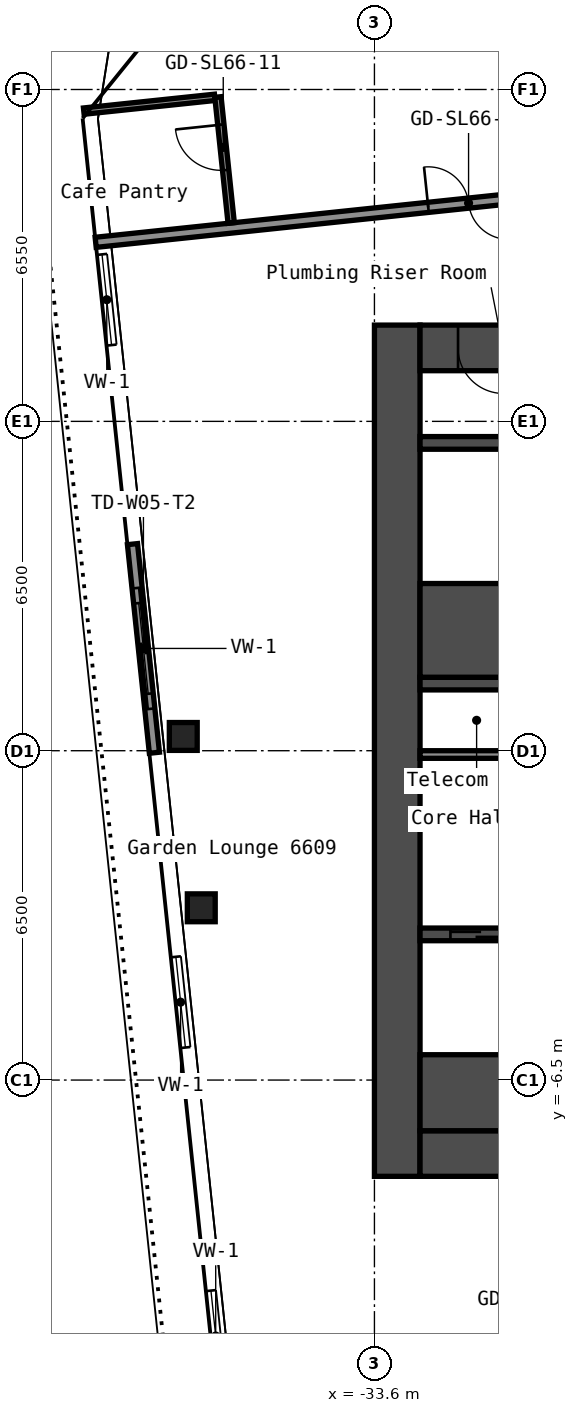
"""IFC4 building model, lengths in metres.
Left out: names, types, materials, properties, quantities, classifications, styles, units other than length and angle.
Written with IfcOpenShell. Run it as: python <this file> out.ifc"""

import sys

from ifc_helpers import new_model, si_unit, direction, frame, frame_2d, origin, origin_2d, place, context, subcontext, project, spatial, rectangle, hollow_rectangle, extrude, element, fill, save


model = new_model("IFC4")
c1 = context("Model", 3, precision=1e-05, world=origin(), true_north=direction((0.0, 1.0)))
c2 = subcontext(c1, "Body", "Model", "MODEL_VIEW")
j1 = project(units=[si_unit("LENGTHUNIT", "METRE"), si_unit("PLANEANGLEUNIT", "RADIAN")], contexts=[c1])
p1 = place(None, origin())
s1 = spatial("IfcSite", under=j1, at=p1, CompositionType="ELEMENT")
p2 = place(p1, origin())
s2 = spatial("IfcBuilding", under=s1, at=p2, CompositionType="ELEMENT")
p3 = place(p2, frame((0.0, 0.0, 232.6)))
s3 = spatial("IfcBuildingStorey", under=s2, at=p3, CompositionType="ELEMENT", Elevation=232.6)
for number, where, z_axis, x_axis in (
    (1, (-37.017, -3.1, 0.0), (0.0, 0.0, 1.0), (1.0, 0.0, 0.0)),
    (2, (-37.373, 0.281, 0.0), (0.0, 0.0, 1.0), (1.0, 0.0, 0.0)),
):
    element("IfcColumn", number, at=place(p3, frame(where, z_axis=z_axis, x_axis=x_axis)), inside=s3, PredefinedType="COLUMN", context=c2, shape_type="SweptSolid", body=[
        extrude(hollow_rectangle(XDim=0.55, YDim=0.55, WallThickness=0.022, InnerFilletRadius=0.033, OuterFilletRadius=0.055, at=origin_2d()), origin(), (0.0, 0.0, 1.0), 5.95),
    ])
p4 = place(p3, frame((-33.15, -8.4, 0.0), z_axis=(0.0, 0.0, 1.0), x_axis=(0.0, 1.0, 0.0)))
e3 = element("IfcWall", 3, at=p4, inside=s3, PredefinedType="SHEAR", context=c2, shape_type="SweptSolid", body=[
    extrude(rectangle(XDim=16.8, YDim=0.9, at=frame_2d((8.4, 0.0))), origin(), (0.0, 0.0, 1.0), 5.95),
])
p5 = place(p3, frame((-32.7, 7.95, 0.0), z_axis=(0.0, 0.0, 1.0), x_axis=(1.0, 0.0, 0.0)))
e4 = element("IfcWall", 4, at=p5, inside=s3, PredefinedType="SHEAR", context=c2, shape_type="SweptSolid", body=[
    extrude(rectangle(XDim=15.0, YDim=0.9, at=frame_2d((7.5, 0.0))), origin(), (0.0, 0.0, 1.0), 5.95),
])
p6 = place(p5, frame((3.4, 0.0, 0.0)))
e5 = element("IfcOpeningElement", 5, at=p6, cuts=e4, PredefinedType="OPENING", context=c2, shape_type="SweptSolid", body=[
    extrude(rectangle(XDim=1.2, YDim=2.1, at=frame_2d((0.6, 1.05))), frame((0.0, 0.46, 0.0), z_axis=(0.0, -1.0, 0.0), x_axis=(1.0, 0.0, 0.0)), (0.0, 0.0, 1.0), 0.92),
])
p7 = place(p5, frame((0.75, 0.0, 0.0)))
e6 = element("IfcOpeningElement", 6, at=p7, cuts=e4, PredefinedType="OPENING", context=c2, shape_type="SweptSolid", body=[
    extrude(rectangle(XDim=0.9, YDim=2.1, at=frame_2d((0.45, 1.05))), frame((0.0, 0.46, 0.0), z_axis=(0.0, -1.0, 0.0), x_axis=(1.0, 0.0, 0.0)), (0.0, 0.0, 1.0), 0.92),
])
p8 = place(p3, frame((-32.7, -7.95, 0.0), z_axis=(0.0, 0.0, 1.0), x_axis=(1.0, 0.0, 0.0)))
e7 = element("IfcWall", 7, at=p8, inside=s3, PredefinedType="SHEAR", context=c2, shape_type="SweptSolid", body=[
    extrude(rectangle(XDim=15.0, YDim=0.9, at=frame_2d((7.5, 0.0))), origin(), (0.0, 0.0, 1.0), 5.95),
])
p9 = place(p8, frame((11.45, 0.0, 0.0)))
e8 = element("IfcOpeningElement", 8, at=p9, cuts=e7, PredefinedType="OPENING", context=c2, shape_type="SweptSolid", body=[
    extrude(rectangle(XDim=1.0, YDim=2.1, at=frame_2d((0.5, 1.05))), frame((0.0, 0.46, 0.0), z_axis=(0.0, -1.0, 0.0), x_axis=(1.0, 0.0, 0.0)), (0.0, 0.0, 1.0), 0.92),
])
p10 = place(p3, frame((-32.7, 1.325, 0.0), z_axis=(0.0, 0.0, 1.0), x_axis=(1.0, 0.0, 0.0)))
e9 = element("IfcWall", 9, at=p10, inside=s3, PredefinedType="SHEAR", context=c2, shape_type="SweptSolid", body=[
    extrude(rectangle(XDim=5.05, YDim=0.25, at=frame_2d((2.525, 0.0))), origin(), (0.0, 0.0, 1.0), 5.95),
])
p11 = place(p10, frame((3.3, 0.0, 0.0)))
e10 = element("IfcOpeningElement", 10, at=p11, cuts=e9, PredefinedType="OPENING", context=c2, shape_type="SweptSolid", body=[
    extrude(rectangle(XDim=1.2, YDim=2.1, at=frame_2d((0.6, 1.05))), frame((0.0, 0.135, 0.0), z_axis=(0.0, -1.0, 0.0), x_axis=(1.0, 0.0, 0.0)), (0.0, 0.0, 1.0), 0.27),
])
p12 = place(p3, frame((-32.7, 2.375, 0.0), z_axis=(0.0, 0.0, 1.0), x_axis=(1.0, 0.0, 0.0)))
e11 = element("IfcWall", 11, at=p12, inside=s3, PredefinedType="SHEAR", context=c2, shape_type="SweptSolid", body=[
    extrude(rectangle(XDim=2.4, YDim=1.85, at=frame_2d((1.2, 0.0))), origin(), (0.0, 0.0, 1.0), 5.95),
])
p13 = place(p3, frame((-32.7, 6.075, 0.0), z_axis=(0.0, 0.0, 1.0), x_axis=(1.0, 0.0, 0.0)))
e12 = element("IfcWall", 12, at=p13, inside=s3, PredefinedType="SHEAR", context=c2, shape_type="SweptSolid", body=[
    extrude(rectangle(XDim=2.4, YDim=0.25, at=frame_2d((1.2, 0.0))), origin(), (0.0, 0.0, 1.0), 5.95),
])
p14 = place(p3, frame((-32.7, -3.625, 0.0), z_axis=(0.0, 0.0, 1.0), x_axis=(1.0, 0.0, 0.0)))
e13 = element("IfcWall", 13, at=p14, inside=s3, PredefinedType="SHEAR", context=c2, shape_type="SweptSolid", body=[
    extrude(rectangle(XDim=4.55, YDim=0.25, at=frame_2d((2.275, 0.0))), origin(), (0.0, 0.0, 1.0), 5.95),
])
p15 = place(p14, frame((2.85, 0.0, 0.0)))
e14 = element("IfcOpeningElement", 14, at=p15, cuts=e13, PredefinedType="OPENING", context=c2, shape_type="SweptSolid", body=[
    extrude(rectangle(XDim=1.1, YDim=2.1, at=frame_2d((0.55, 1.05))), frame((0.0, 0.135, 0.0), z_axis=(0.0, -1.0, 0.0), x_axis=(1.0, 0.0, 0.0)), (0.0, 0.0, 1.0), 0.27),
])
p16 = place(p14, frame((0.6, 0.0, 0.0)))
e15 = element("IfcOpeningElement", 15, at=p16, cuts=e13, PredefinedType="OPENING", context=c2, shape_type="SweptSolid", body=[
    extrude(rectangle(XDim=1.1, YDim=2.1, at=frame_2d((0.55, 1.05))), frame((0.0, 0.135, 0.0), z_axis=(0.0, -1.0, 0.0), x_axis=(1.0, 0.0, 0.0)), (0.0, 0.0, 1.0), 0.27),
])
p17 = place(p3, frame((-32.7, -6.75, 0.0), z_axis=(0.0, 0.0, 1.0), x_axis=(1.0, 0.0, 0.0)))
e16 = element("IfcWall", 16, at=p17, inside=s3, PredefinedType="SHEAR", context=c2, shape_type="SweptSolid", body=[
    extrude(rectangle(XDim=4.55, YDim=1.5, at=frame_2d((2.275, 0.0))), origin(), (0.0, 0.0, 1.0), 5.95),
])
p18 = place(p3, frame((-32.7, -0.075, 0.0), z_axis=(0.0, 0.0, 1.0), x_axis=(1.0, 0.0, 0.0)))
e17 = element("IfcWall", 17, at=p18, inside=s3, PredefinedType="PARTITIONING", context=c2, shape_type="SweptSolid", body=[
    extrude(rectangle(XDim=3.0, YDim=0.15, at=frame_2d((1.5, 0.0))), origin(), (0.0, 0.0, 1.0), 5.95),
])
p19 = place(p3, frame((-36.712, -12.705, 0.0), z_axis=(0.0, 0.0, 1.0), x_axis=(0.994522460242, 0.104523088709, 0.0)))
e18 = element("IfcWall", 18, at=p19, inside=s3, PredefinedType="PARTITIONING", context=c2, shape_type="SweptSolid", body=[
    extrude(rectangle(XDim=21.3, YDim=0.2, at=frame_2d((10.65, 0.0))), origin(), (0.0, 0.0, 1.0), 5.95),
])
p20 = place(p19, frame((1.59, 0.0, 0.0)))
e19 = element("IfcOpeningElement", 19, at=p20, cuts=e18, PredefinedType="OPENING", context=c2, shape_type="SweptSolid", body=[
    extrude(rectangle(XDim=0.9, YDim=2.1, at=frame_2d((0.45, 1.05))), frame((0.0, 0.11, 0.0), z_axis=(0.0, -1.0, 0.0), x_axis=(1.0, 0.0, 0.0)), (0.0, 0.0, 1.0), 0.22),
])
p21 = place(p19, frame((5.875, 0.0, 0.0)))
e20 = element("IfcOpeningElement", 20, at=p21, cuts=e18, PredefinedType="OPENING", context=c2, shape_type="SweptSolid", body=[
    extrude(rectangle(XDim=0.9, YDim=2.1, at=frame_2d((0.45, 1.05))), frame((0.0, 0.11, 0.0), z_axis=(0.0, -1.0, 0.0), x_axis=(1.0, 0.0, 0.0)), (0.0, 0.0, 1.0), 0.22),
])
p22 = place(p19, frame((10.435, 0.0, 0.0)))
e21 = element("IfcOpeningElement", 21, at=p22, cuts=e18, PredefinedType="OPENING", context=c2, shape_type="SweptSolid", body=[
    extrude(rectangle(XDim=0.9, YDim=2.1, at=frame_2d((0.45, 1.05))), frame((0.0, 0.11, 0.0), z_axis=(0.0, -1.0, 0.0), x_axis=(1.0, 0.0, 0.0)), (0.0, 0.0, 1.0), 0.22),
])
p23 = place(p19, frame((14.3, 0.0, 0.0)))
e22 = element("IfcOpeningElement", 22, at=p23, cuts=e18, PredefinedType="OPENING", context=c2, shape_type="SweptSolid", body=[
    extrude(rectangle(XDim=0.9, YDim=2.1, at=frame_2d((0.45, 1.05))), frame((0.0, 0.11, 0.0), z_axis=(0.0, -1.0, 0.0), x_axis=(1.0, 0.0, 0.0)), (0.0, 0.0, 1.0), 0.22),
])
p24 = place(p19, frame((18.5, 0.0, 0.0)))
e23 = element("IfcOpeningElement", 23, at=p24, cuts=e18, PredefinedType="OPENING", context=c2, shape_type="SweptSolid", body=[
    extrude(rectangle(XDim=0.9, YDim=2.1, at=frame_2d((0.45, 1.05))), frame((0.0, 0.11, 0.0), z_axis=(0.0, -1.0, 0.0), x_axis=(1.0, 0.0, 0.0)), (0.0, 0.0, 1.0), 0.22),
])
p25 = place(p3, frame((-39.102, 10.034, 0.0), z_axis=(0.0, 0.0, 1.0), x_axis=(0.994522585465, 0.104521897229, 0.0)))
e24 = element("IfcWall", 24, at=p25, inside=s3, PredefinedType="PARTITIONING", context=c2, shape_type="SweptSolid", body=[
    extrude(rectangle(XDim=21.3, YDim=0.2, at=frame_2d((10.65, 0.0))), origin(), (0.0, 0.0, 1.0), 5.95),
])
p26 = place(p25, frame((6.6, 0.0, 0.0)))
e25 = element("IfcOpeningElement", 25, at=p26, cuts=e24, PredefinedType="OPENING", context=c2, shape_type="SweptSolid", body=[
    extrude(rectangle(XDim=1.6, YDim=2.1, at=frame_2d((0.8, 1.05))), frame((0.0, 0.11, 0.0), z_axis=(0.0, -1.0, 0.0), x_axis=(1.0, 0.0, 0.0)), (0.0, 0.0, 1.0), 0.22),
])
p27 = place(p25, frame((15.14, 0.0, 0.0)))
e26 = element("IfcOpeningElement", 26, at=p27, cuts=e24, PredefinedType="OPENING", context=c2, shape_type="SweptSolid", body=[
    extrude(rectangle(XDim=0.9, YDim=2.1, at=frame_2d((0.45, 1.05))), frame((0.0, 0.11, 0.0), z_axis=(0.0, -1.0, 0.0), x_axis=(1.0, 0.0, 0.0)), (0.0, 0.0, 1.0), 0.22),
])
p28 = place(p25, frame((19.34, 0.0, 0.0)))
e27 = element("IfcOpeningElement", 27, at=p28, cuts=e24, PredefinedType="OPENING", context=c2, shape_type="SweptSolid", body=[
    extrude(rectangle(XDim=0.9, YDim=2.1, at=frame_2d((0.45, 1.05))), frame((0.0, 0.11, 0.0), z_axis=(0.0, -1.0, 0.0), x_axis=(1.0, 0.0, 0.0)), (0.0, 0.0, 1.0), 0.22),
])
p29 = place(p3, frame((-39.336, 12.624, 0.0), z_axis=(0.0, 0.0, 1.0), x_axis=(0.994523446942, 0.104513699976, 0.0)))
e28 = element("IfcWall", 28, at=p29, inside=s3, PredefinedType="PARTITIONING", context=c2, shape_type="SweptSolid", body=[
    extrude(rectangle(XDim=2.6, YDim=0.125, at=frame_2d((1.3, 0.0))), origin(), (0.0, 0.0, 1.0), 5.95),
])
p30 = place(p3, frame((-36.427, 10.416, 0.0), z_axis=(0.0, 0.0, 1.0), x_axis=(-0.104491611519, 0.994525767953, 0.0)))
e29 = element("IfcWall", 29, at=p30, inside=s3, PredefinedType="PARTITIONING", context=c2, shape_type="SweptSolid", body=[
    extrude(rectangle(XDim=2.5, YDim=0.125, at=frame_2d((1.25, 0.0))), origin(), (0.0, 0.0, 1.0), 5.95),
])
p31 = place(p30, frame((1.05, 0.0, 0.0)))
e30 = element("IfcOpeningElement", 30, at=p31, cuts=e29, PredefinedType="OPENING", context=c2, shape_type="SweptSolid", body=[
    extrude(rectangle(XDim=0.9, YDim=2.1, at=frame_2d((0.45, 1.05))), frame((0.0, 0.073, 0.0), z_axis=(0.0, -1.0, 0.0), x_axis=(1.0, 0.0, 0.0)), (0.0, 0.0, 1.0), 0.145),
])
p32 = place(p3, frame((-39.256, 12.461, 4.45), z_axis=(0.0, 0.0, 1.0), x_axis=(0.104506598742, -0.994524193179, 0.0)))
p33 = place(p32, frame((2.68, 0.0, 0.25)))
p34 = place(p33, origin())
e31 = element("IfcWindow", 31, at=p34, inside=s3, PartitioningType="SINGLE_PANEL", PredefinedType="WINDOW", context=c2, shape_type="SweptSolid", body=[
    extrude(rectangle(XDim=1.8, YDim=0.9, at=frame_2d((0.9, 0.45))), frame((0.0, 0.03, 0.0), z_axis=(0.0, -1.0, 0.0), x_axis=(1.0, 0.0, 0.0)), (0.0, 0.0, 1.0), 0.06),
])
p35 = place(p3, frame((-38.526, 5.509, 4.45), z_axis=(0.0, 0.0, 1.0), x_axis=(0.104543574031, -0.994520307047, 0.0)))
p36 = place(p35, frame((2.61, 0.0, 0.25)))
p37 = place(p36, origin())
e32 = element("IfcWindow", 32, at=p37, inside=s3, PartitioningType="SINGLE_PANEL", PredefinedType="WINDOW", context=c2, shape_type="SweptSolid", body=[
    extrude(rectangle(XDim=1.8, YDim=0.9, at=frame_2d((0.9, 0.45))), frame((0.0, 0.03, 0.0), z_axis=(0.0, -1.0, 0.0), x_axis=(1.0, 0.0, 0.0)), (0.0, 0.0, 1.0), 0.06),
])
p38 = place(p3, frame((-37.792, -1.472, 4.45), z_axis=(0.0, 0.0, 1.0), x_axis=(0.104512790532, -0.994523542514, 0.0)))
p39 = place(p38, frame((2.61, 0.0, 0.25)))
p40 = place(p39, origin())
e33 = element("IfcWindow", 33, at=p40, inside=s3, PartitioningType="SINGLE_PANEL", PredefinedType="WINDOW", context=c2, shape_type="SweptSolid", body=[
    extrude(rectangle(XDim=1.8, YDim=0.9, at=frame_2d((0.9, 0.45))), frame((0.0, 0.03, 0.0), z_axis=(0.0, -1.0, 0.0), x_axis=(1.0, 0.0, 0.0)), (0.0, 0.0, 1.0), 0.06),
])
p41 = place(p3, frame((-37.058, -8.453, 4.45), z_axis=(0.0, 0.0, 1.0), x_axis=(0.104541145751, -0.994520562304, 0.0)))
p42 = place(p41, frame((2.214, 0.0, 0.25)))
p43 = place(p42, origin())
e34 = element("IfcWindow", 34, at=p43, inside=s3, PartitioningType="SINGLE_PANEL", PredefinedType="WINDOW", context=c2, shape_type="SweptSolid", body=[
    extrude(rectangle(XDim=1.8, YDim=0.9, at=frame_2d((0.9, 0.45))), frame((0.0, 0.03, 0.0), z_axis=(0.0, -1.0, 0.0), x_axis=(1.0, 0.0, 0.0)), (0.0, 0.0, 1.0), 0.06),
])
p44 = place(p3, frame((-38.375, 4.077, 0.0), z_axis=(0.0, 0.0, 1.0), x_axis=(0.10450059231, -0.994524824329, 0.0)))
p45 = place(p44, frame((0.87, 0.0, 0.0)))
p46 = place(p45, frame((2.4, 0.0, 0.0), z_axis=(0.0, 0.0, 1.0), x_axis=(-1.0, 0.0, 0.0)))
e35 = element("IfcDoor", 35, at=p46, inside=s3, OperationType="SLIDING_TO_LEFT", PredefinedType="DOOR", context=c2, shape_type="SweptSolid", body=[
    extrude(rectangle(XDim=2.4, YDim=2.2, at=frame_2d((1.2, 1.1))), frame((0.0, 0.025, 0.0), z_axis=(0.0, -1.0, 0.0), x_axis=(1.0, 0.0, 0.0)), (0.0, 0.0, 1.0), 0.05),
])
p47 = place(p7, origin())
e36 = element("IfcDoor", 36, at=p47, inside=s3, OperationType="SINGLE_SWING_RIGHT", PredefinedType="DOOR", context=c2, shape_type="SweptSolid", body=[
    extrude(rectangle(XDim=0.9, YDim=2.1, at=frame_2d((0.45, 1.05))), frame((0.0, 0.025, 0.0), z_axis=(0.0, -1.0, 0.0), x_axis=(1.0, 0.0, 0.0)), (0.0, 0.0, 1.0), 0.05),
])
fill(e6, e36)
p48 = place(p16, origin())
e37 = element("IfcDoor", 37, at=p48, inside=s3, OperationType="DOUBLE_DOOR_SLIDING", PredefinedType="DOOR", context=c2, shape_type="SweptSolid", body=[
    extrude(rectangle(XDim=1.1, YDim=2.1, at=frame_2d((0.55, 1.05))), frame((0.0, 0.025, 0.0), z_axis=(0.0, -1.0, 0.0), x_axis=(1.0, 0.0, 0.0)), (0.0, 0.0, 1.0), 0.05),
])
fill(e15, e37)
p49 = place(p26, origin())
e38 = element("IfcDoor", 38, at=p49, inside=s3, OperationType="DOUBLE_DOOR_SINGLE_SWING", PredefinedType="DOOR", context=c2, shape_type="SweptSolid", body=[
    extrude(rectangle(XDim=1.6, YDim=2.1, at=frame_2d((0.8, 1.05))), frame((0.0, 0.025, 0.0), z_axis=(0.0, -1.0, 0.0), x_axis=(1.0, 0.0, 0.0)), (0.0, 0.0, 1.0), 0.05),
])
fill(e25, e38)
p50 = place(p31, origin())
e39 = element("IfcDoor", 39, at=p50, inside=s3, OperationType="SINGLE_SWING_LEFT", PredefinedType="DOOR", context=c2, shape_type="SweptSolid", body=[
    extrude(rectangle(XDim=0.9, YDim=2.1, at=frame_2d((0.45, 1.05))), frame((0.0, 0.025, 0.0), z_axis=(0.0, -1.0, 0.0), x_axis=(1.0, 0.0, 0.0)), (0.0, 0.0, 1.0), 0.05),
])
fill(e30, e39)
save(model, sys.argv[1])
